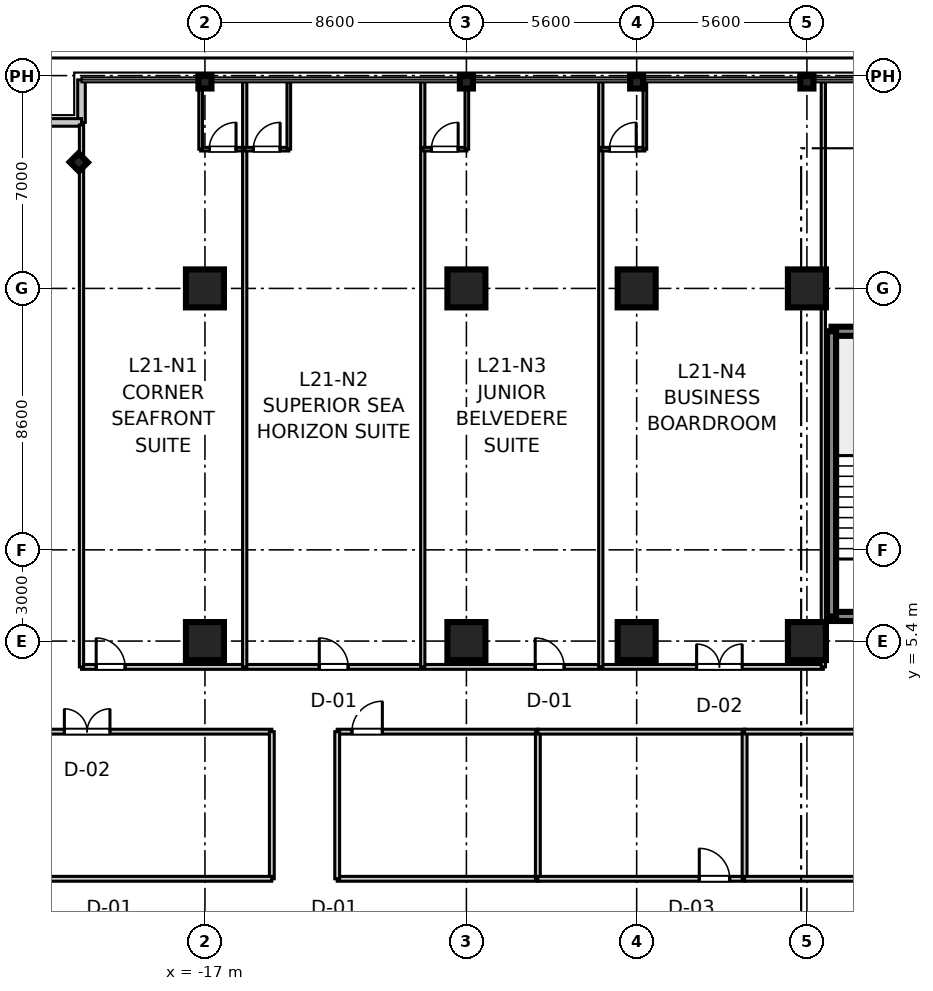
"""IFC4 building model, lengths in metres.
Left out: names, types, materials, properties, quantities, classifications, styles, units other than length and angle.
Written with IfcOpenShell. Run it as: python <this file> out.ifc"""

import sys

from ifc_helpers import new_model, si_unit, direction, frame, frame_2d, origin, origin_2d, place, context, subcontext, project, spatial, rectangle, i_section, extrude, source, transform, mapped, element, fill, save


model = new_model("IFC4")
c1 = context("Model", 3, precision=1e-05, world=origin(), true_north=direction((0.0, 1.0)))
c2 = subcontext(c1, "Body", "Model", "MODEL_VIEW")
j1 = project(units=[si_unit("LENGTHUNIT", "METRE"), si_unit("PLANEANGLEUNIT", "RADIAN")], contexts=[c1])
p1 = place(None, origin())
s1 = spatial("IfcSite", under=j1, at=p1, CompositionType="ELEMENT")
p2 = place(p1, origin())
s2 = spatial("IfcBuilding", under=s1, at=p2, CompositionType="ELEMENT")
p3 = place(p2, frame((0.0, 0.0, 88.3)))
s3 = spatial("IfcBuildingStorey", under=s2, at=p3, CompositionType="ELEMENT", Elevation=88.3)
m1 = source(origin(), c2, "Body", "SweptSolid", [
    extrude(rectangle(XDim=1.25, YDim=1.25, at=origin_2d()), origin(), (0.0, 0.0, 1.0), 3.605),
])
for number, where, z_axis, x_axis in (
    (1, (-17.0, 5.4, 0.0), (0.0, 0.0, 1.0), (1.0, 0.0, 0.0)),
    (2, (-17.0, 17.0, 0.0), (0.0, 0.0, 1.0), (1.0, 0.0, 0.0)),
    (3, (-8.4, 5.4, 0.0), (0.0, 0.0, 1.0), (1.0, 0.0, 0.0)),
    (4, (-8.4, 17.0, 0.0), (0.0, 0.0, 1.0), (1.0, 0.0, 0.0)),
    (5, (-2.8, 5.4, 0.0), (0.0, 0.0, 1.0), (1.0, 0.0, 0.0)),
    (6, (-2.8, 17.0, 0.0), (0.0, 0.0, 1.0), (1.0, 0.0, 0.0)),
    (7, (2.8, 5.4, 0.0), (0.0, 0.0, 1.0), (1.0, 0.0, 0.0)),
    (8, (2.8, 17.0, 0.0), (0.0, 0.0, 1.0), (1.0, 0.0, 0.0)),
):
    element("IfcColumn", number, at=place(p3, frame(where, z_axis=z_axis, x_axis=x_axis)), inside=s3, PredefinedType="COLUMN", context=c2, shape_type="MappedRepresentation", body=[
        mapped(m1, transform((0.0, 0.0, 0.0), scale=1.0)),
    ])
m2 = source(origin(), c2, "Body", "SweptSolid", [
    extrude(i_section(OverallWidth=0.409, OverallDepth=0.43, WebThickness=0.021, FlangeThickness=0.034, at=origin_2d()), origin(), (0.0, 0.0, 1.0), 3.605),
])
for number, where, z_axis, x_axis in (
    (9, (-17.0, 23.78, 0.0), (0.0, 0.0, 1.0), (0.0, 1.0, 0.0)),
    (10, (-8.4, 23.78, 0.0), (0.0, 0.0, 1.0), (0.0, 1.0, 0.0)),
    (11, (-2.8, 23.78, 0.0), (0.0, 0.0, 1.0), (0.0, 1.0, 0.0)),
    (12, (2.8, 23.78, 0.0), (0.0, 0.0, 1.0), (0.0, 1.0, 0.0)),
    (13, (-21.15, 21.15, 0.0), (0.0, 0.0, 1.0), (0.707, 0.707, 0.0)),
):
    element("IfcColumn", number, at=place(p3, frame(where, z_axis=z_axis, x_axis=x_axis)), inside=s3, PredefinedType="COLUMN", context=c2, shape_type="MappedRepresentation", body=[
        mapped(m2, transform((0.0, 0.0, 0.0), scale=1.0)),
    ])
m3 = source(origin(), c2, "Body", "SweptSolid", [
    extrude(rectangle(XDim=3.98, YDim=0.3, at=frame_2d((1.99, 0.0))), origin(), (0.0, 0.0, 1.0), 3.38),
])
for number, where, z_axis, x_axis in (
    (14, (3.61, 6.21, 0.0), (0.0, 0.0, 1.0), (1.0, 0.0, 0.0)),
    (15, (3.61, 15.59, 0.0), (0.0, 0.0, 1.0), (1.0, 0.0, 0.0)),
):
    element("IfcWall", number, at=place(p3, frame(where, z_axis=z_axis, x_axis=x_axis)), inside=s3, PredefinedType="SHEAR", context=c2, shape_type="MappedRepresentation", body=[
        mapped(m3, transform((0.0, 0.0, 0.0), scale=1.0)),
    ])
m4 = source(origin(), c2, "Body", "SweptSolid", [
    extrude(rectangle(XDim=9.38, YDim=0.3, at=frame_2d((4.69, 0.0))), origin(), (0.0, 0.0, 1.0), 3.38),
])
p4 = place(p3, frame((3.61, 6.21, 0.0), z_axis=(0.0, 0.0, 1.0), x_axis=(0.0, 1.0, 0.0)))
e16 = element("IfcWall", 16, at=p4, inside=s3, PredefinedType="SHEAR", context=c2, shape_type="MappedRepresentation", body=[
    mapped(m4, transform((0.0, 0.0, 0.0), scale=1.0)),
])
m5 = source(origin(), c2, "Body", "SweptSolid", [
    extrude(rectangle(XDim=1.4, YDim=0.25, at=frame_2d((0.7, 0.0))), origin(), (0.0, 0.0, 1.0), 3.38),
])
p5 = place(p3, frame((-21.06, 22.46, 0.0), z_axis=(0.0, 0.0, 1.0), x_axis=(0.0, 1.0, 0.0)))
e17 = element("IfcWall", 17, at=p5, inside=s3, PredefinedType="STANDARD", context=c2, shape_type="MappedRepresentation", body=[
    mapped(m5, transform((0.0, 0.0, 0.0), scale=1.0)),
])
m6 = source(origin(), c2, "Body", "SweptSolid", [
    extrude(rectangle(XDim=1.4, YDim=0.25, at=frame_2d((0.7, 0.0))), origin(), (0.0, 0.0, 1.0), 3.38),
])
p6 = place(p3, frame((-22.46, 22.46, 0.0), z_axis=(0.0, 0.0, 1.0), x_axis=(1.0, 0.0, 0.0)))
e18 = element("IfcWall", 18, at=p6, inside=s3, PredefinedType="STANDARD", context=c2, shape_type="MappedRepresentation", body=[
    mapped(m6, transform((0.0, 0.0, 0.0), scale=1.0)),
])
m7 = source(origin(), c2, "Body", "SweptSolid", [
    extrude(rectangle(XDim=24.4, YDim=0.16, at=frame_2d((12.2, 0.0))), origin(), (0.0, 0.0, 1.0), 2.72),
])
p7 = place(p3, frame((-21.06, 4.55, 0.0), z_axis=(0.0, 0.0, 1.0), x_axis=(1.0, 0.0, 0.0)))
e19 = element("IfcWall", 19, at=p7, inside=s3, PredefinedType="PARTITIONING", context=c2, shape_type="MappedRepresentation", body=[
    mapped(m7, transform((0.0, 0.0, 0.0), scale=1.0)),
])
p8 = place(p7, frame((0.483, 0.0, 0.0)))
e20 = element("IfcOpeningElement", 20, at=p8, cuts=e19, PredefinedType="OPENING", context=c2, shape_type="SweptSolid", body=[
    extrude(rectangle(XDim=0.95, YDim=2.1, at=frame_2d((0.475, 1.05))), frame((0.0, 0.09, 0.0), z_axis=(0.0, -1.0, 0.0), x_axis=(1.0, 0.0, 0.0)), (0.0, 0.0, 1.0), 0.18),
])
p9 = place(p7, frame((7.821, 0.0, 0.0)))
e21 = element("IfcOpeningElement", 21, at=p9, cuts=e19, PredefinedType="OPENING", context=c2, shape_type="SweptSolid", body=[
    extrude(rectangle(XDim=0.95, YDim=2.1, at=frame_2d((0.475, 1.05))), frame((0.0, 0.09, 0.0), z_axis=(0.0, -1.0, 0.0), x_axis=(1.0, 0.0, 0.0)), (0.0, 0.0, 1.0), 0.18),
])
p10 = place(p7, frame((14.924, 0.0, 0.0)))
e22 = element("IfcOpeningElement", 22, at=p10, cuts=e19, PredefinedType="OPENING", context=c2, shape_type="SweptSolid", body=[
    extrude(rectangle(XDim=0.95, YDim=2.1, at=frame_2d((0.475, 1.05))), frame((0.0, 0.09, 0.0), z_axis=(0.0, -1.0, 0.0), x_axis=(1.0, 0.0, 0.0)), (0.0, 0.0, 1.0), 0.18),
])
p11 = place(p7, frame((20.232, 0.0, 0.0)))
e23 = element("IfcOpeningElement", 23, at=p11, cuts=e19, PredefinedType="OPENING", context=c2, shape_type="SweptSolid", body=[
    extrude(rectangle(XDim=1.5, YDim=2.15, at=frame_2d((0.75, 1.075))), frame((0.0, 0.09, 0.0), z_axis=(0.0, -1.0, 0.0), x_axis=(1.0, 0.0, 0.0)), (0.0, 0.0, 1.0), 0.18),
])
m8 = source(origin(), c2, "Body", "SweptSolid", [
    extrude(rectangle(XDim=17.83, YDim=0.14, at=frame_2d((8.915, 0.0))), origin(), (0.0, 0.0, 1.0), 2.72),
])
p12 = place(p3, frame((-21.06, 4.55, 0.0), z_axis=(0.0, 0.0, 1.0), x_axis=(0.0, 1.0, 0.0)))
e24 = element("IfcWall", 24, at=p12, inside=s3, PredefinedType="PARTITIONING", context=c2, shape_type="MappedRepresentation", body=[
    mapped(m8, transform((0.0, 0.0, 0.0), scale=1.0)),
])
m9 = source(origin(), c2, "Body", "SweptSolid", [
    extrude(rectangle(XDim=19.25, YDim=0.14, at=frame_2d((9.625, 0.0))), origin(), (0.0, 0.0, 1.0), 2.72),
])
p13 = place(p3, frame((3.34, 4.55, 0.0), z_axis=(0.0, 0.0, 1.0), x_axis=(0.0, 1.0, 0.0)))
e25 = element("IfcWall", 25, at=p13, inside=s3, PredefinedType="PARTITIONING", context=c2, shape_type="MappedRepresentation", body=[
    mapped(m9, transform((0.0, 0.0, 0.0), scale=1.0)),
])
m10 = source(origin(), c2, "Body", "SweptSolid", [
    extrude(rectangle(XDim=1.45, YDim=0.12, at=frame_2d((0.725, 0.0))), origin(), (0.0, 0.0, 1.0), 2.72),
])
p14 = place(p3, frame((-17.142, 21.58, 0.0), z_axis=(0.0, 0.0, 1.0), x_axis=(1.0, 0.0, 0.0)))
e26 = element("IfcWall", 26, at=p14, inside=s3, PredefinedType="PARTITIONING", context=c2, shape_type="MappedRepresentation", body=[
    mapped(m10, transform((0.0, 0.0, 0.0), scale=1.0)),
])
p15 = place(p14, frame((0.285, 0.0, 0.0)))
e27 = element("IfcOpeningElement", 27, at=p15, cuts=e26, PredefinedType="OPENING", context=c2, shape_type="SweptSolid", body=[
    extrude(rectangle(XDim=0.88, YDim=2.1, at=frame_2d((0.44, 1.05))), frame((0.0, 0.07, 0.0), z_axis=(0.0, -1.0, 0.0), x_axis=(1.0, 0.0, 0.0)), (0.0, 0.0, 1.0), 0.14),
])
m11 = source(origin(), c2, "Body", "SweptSolid", [
    extrude(rectangle(XDim=2.22, YDim=0.12, at=frame_2d((1.11, 0.0))), origin(), (0.0, 0.0, 1.0), 2.72),
])
p16 = place(p3, frame((-17.142, 21.58, 0.0), z_axis=(0.0, 0.0, 1.0), x_axis=(0.0, 1.0, 0.0)))
e28 = element("IfcWall", 28, at=p16, inside=s3, PredefinedType="PARTITIONING", context=c2, shape_type="MappedRepresentation", body=[
    mapped(m11, transform((0.0, 0.0, 0.0), scale=1.0)),
])
p17 = place(p3, frame((-15.692, 4.55, 0.0), z_axis=(0.0, 0.0, 1.0), x_axis=(0.0, 1.0, 0.0)))
e29 = element("IfcWall", 29, at=p17, inside=s3, PredefinedType="PARTITIONING", context=c2, shape_type="MappedRepresentation", body=[
    mapped(m9, transform((0.0, 0.0, 0.0), scale=1.0)),
])
m12 = source(origin(), c2, "Body", "SweptSolid", [
    extrude(rectangle(XDim=1.45, YDim=0.12, at=frame_2d((0.725, 0.0))), origin(), (0.0, 0.0, 1.0), 2.72),
])
p18 = place(p3, frame((-15.692, 21.58, 0.0), z_axis=(0.0, 0.0, 1.0), x_axis=(1.0, 0.0, 0.0)))
e30 = element("IfcWall", 30, at=p18, inside=s3, PredefinedType="PARTITIONING", context=c2, shape_type="MappedRepresentation", body=[
    mapped(m12, transform((0.0, 0.0, 0.0), scale=1.0)),
])
p19 = place(p18, frame((0.285, 0.0, 0.0)))
e31 = element("IfcOpeningElement", 31, at=p19, cuts=e30, PredefinedType="OPENING", context=c2, shape_type="SweptSolid", body=[
    extrude(rectangle(XDim=0.88, YDim=2.1, at=frame_2d((0.44, 1.05))), frame((0.0, 0.07, 0.0), z_axis=(0.0, -1.0, 0.0), x_axis=(1.0, 0.0, 0.0)), (0.0, 0.0, 1.0), 0.14),
])
p20 = place(p3, frame((-14.242, 21.58, 0.0), z_axis=(0.0, 0.0, 1.0), x_axis=(0.0, 1.0, 0.0)))
e32 = element("IfcWall", 32, at=p20, inside=s3, PredefinedType="PARTITIONING", context=c2, shape_type="MappedRepresentation", body=[
    mapped(m11, transform((0.0, 0.0, 0.0), scale=1.0)),
])
p21 = place(p3, frame((-9.836, 4.55, 0.0), z_axis=(0.0, 0.0, 1.0), x_axis=(0.0, 1.0, 0.0)))
e33 = element("IfcWall", 33, at=p21, inside=s3, PredefinedType="PARTITIONING", context=c2, shape_type="MappedRepresentation", body=[
    mapped(m9, transform((0.0, 0.0, 0.0), scale=1.0)),
])
p22 = place(p3, frame((-9.836, 21.58, 0.0), z_axis=(0.0, 0.0, 1.0), x_axis=(1.0, 0.0, 0.0)))
e34 = element("IfcWall", 34, at=p22, inside=s3, PredefinedType="PARTITIONING", context=c2, shape_type="MappedRepresentation", body=[
    mapped(m12, transform((0.0, 0.0, 0.0), scale=1.0)),
])
p23 = place(p22, frame((0.285, 0.0, 0.0)))
e35 = element("IfcOpeningElement", 35, at=p23, cuts=e34, PredefinedType="OPENING", context=c2, shape_type="SweptSolid", body=[
    extrude(rectangle(XDim=0.88, YDim=2.1, at=frame_2d((0.44, 1.05))), frame((0.0, 0.07, 0.0), z_axis=(0.0, -1.0, 0.0), x_axis=(1.0, 0.0, 0.0)), (0.0, 0.0, 1.0), 0.14),
])
p24 = place(p3, frame((-8.386, 21.58, 0.0), z_axis=(0.0, 0.0, 1.0), x_axis=(0.0, 1.0, 0.0)))
e36 = element("IfcWall", 36, at=p24, inside=s3, PredefinedType="PARTITIONING", context=c2, shape_type="MappedRepresentation", body=[
    mapped(m11, transform((0.0, 0.0, 0.0), scale=1.0)),
])
p25 = place(p3, frame((-3.98, 4.55, 0.0), z_axis=(0.0, 0.0, 1.0), x_axis=(0.0, 1.0, 0.0)))
e37 = element("IfcWall", 37, at=p25, inside=s3, PredefinedType="PARTITIONING", context=c2, shape_type="MappedRepresentation", body=[
    mapped(m9, transform((0.0, 0.0, 0.0), scale=1.0)),
])
p26 = place(p3, frame((-3.98, 21.58, 0.0), z_axis=(0.0, 0.0, 1.0), x_axis=(1.0, 0.0, 0.0)))
e38 = element("IfcWall", 38, at=p26, inside=s3, PredefinedType="PARTITIONING", context=c2, shape_type="MappedRepresentation", body=[
    mapped(m12, transform((0.0, 0.0, 0.0), scale=1.0)),
])
p27 = place(p26, frame((0.285, 0.0, 0.0)))
e39 = element("IfcOpeningElement", 39, at=p27, cuts=e38, PredefinedType="OPENING", context=c2, shape_type="SweptSolid", body=[
    extrude(rectangle(XDim=0.88, YDim=2.1, at=frame_2d((0.44, 1.05))), frame((0.0, 0.07, 0.0), z_axis=(0.0, -1.0, 0.0), x_axis=(1.0, 0.0, 0.0)), (0.0, 0.0, 1.0), 0.14),
])
p28 = place(p3, frame((-2.53, 21.58, 0.0), z_axis=(0.0, 0.0, 1.0), x_axis=(0.0, 1.0, 0.0)))
e40 = element("IfcWall", 40, at=p28, inside=s3, PredefinedType="PARTITIONING", context=c2, shape_type="MappedRepresentation", body=[
    mapped(m11, transform((0.0, 0.0, 0.0), scale=1.0)),
])
m13 = source(origin(), c2, "Body", "SweptSolid", [
    extrude(rectangle(XDim=9.0, YDim=0.16, at=frame_2d((4.5, 0.0))), origin(), (0.0, 0.0, 1.0), 2.72),
])
p29 = place(p3, frame((-23.8, 2.42, 0.0), z_axis=(0.0, 0.0, 1.0), x_axis=(1.0, 0.0, 0.0)))
e41 = element("IfcWall", 41, at=p29, inside=s3, PredefinedType="PARTITIONING", context=c2, shape_type="MappedRepresentation", body=[
    mapped(m13, transform((0.0, 0.0, 0.0), scale=1.0)),
])
p30 = place(p29, frame((2.176, 0.0, 0.0)))
e42 = element("IfcOpeningElement", 42, at=p30, cuts=e41, PredefinedType="OPENING", context=c2, shape_type="SweptSolid", body=[
    extrude(rectangle(XDim=1.5, YDim=2.15, at=frame_2d((0.75, 1.075))), frame((0.0, 0.09, 0.0), z_axis=(0.0, -1.0, 0.0), x_axis=(1.0, 0.0, 0.0)), (0.0, 0.0, 1.0), 0.18),
])
m14 = source(origin(), c2, "Body", "SweptSolid", [
    extrude(rectangle(XDim=4.84, YDim=0.16, at=frame_2d((2.42, 0.0))), origin(), (0.0, 0.0, 1.0), 2.72),
])
p31 = place(p3, frame((-14.8, -2.42, 0.0), z_axis=(0.0, 0.0, 1.0), x_axis=(0.0, 1.0, 0.0)))
e43 = element("IfcWall", 43, at=p31, inside=s3, PredefinedType="PARTITIONING", context=c2, shape_type="MappedRepresentation", body=[
    mapped(m14, transform((0.0, 0.0, 0.0), scale=1.0)),
])
p32 = place(p3, frame((-23.8, -2.42, 0.0), z_axis=(0.0, 0.0, 1.0), x_axis=(1.0, 0.0, 0.0)))
e44 = element("IfcWall", 44, at=p32, inside=s3, PredefinedType="PARTITIONING", context=c2, shape_type="MappedRepresentation", body=[
    mapped(m13, transform((0.0, 0.0, 0.0), scale=1.0)),
])
m15 = source(origin(), c2, "Body", "SweptSolid", [
    extrude(rectangle(XDim=6.6, YDim=0.16, at=frame_2d((3.3, 0.0))), origin(), (0.0, 0.0, 1.0), 2.72),
])
p33 = place(p3, frame((-12.65, -2.42, 0.0), z_axis=(0.0, 0.0, 1.0), x_axis=(1.0, 0.0, 0.0)))
e45 = element("IfcWall", 45, at=p33, inside=s3, PredefinedType="PARTITIONING", context=c2, shape_type="MappedRepresentation", body=[
    mapped(m15, transform((0.0, 0.0, 0.0), scale=1.0)),
])
p34 = place(p3, frame((-12.65, 2.42, 0.0), z_axis=(0.0, 0.0, 1.0), x_axis=(1.0, 0.0, 0.0)))
e46 = element("IfcWall", 46, at=p34, inside=s3, PredefinedType="PARTITIONING", context=c2, shape_type="MappedRepresentation", body=[
    mapped(m15, transform((0.0, 0.0, 0.0), scale=1.0)),
])
p35 = place(p34, frame((0.485, 0.0, 0.0)))
e47 = element("IfcOpeningElement", 47, at=p35, cuts=e46, PredefinedType="OPENING", context=c2, shape_type="SweptSolid", body=[
    extrude(rectangle(XDim=1.0, YDim=2.1, at=frame_2d((0.5, 1.05))), frame((0.0, 0.09, 0.0), z_axis=(0.0, -1.0, 0.0), x_axis=(1.0, 0.0, 0.0)), (0.0, 0.0, 1.0), 0.18),
])
for number, where, z_axis, x_axis in (
    (48, (-12.65, -2.42, 0.0), (0.0, 0.0, 1.0), (0.0, 1.0, 0.0)),
    (49, (-6.05, -2.42, 0.0), (0.0, 0.0, 1.0), (0.0, 1.0, 0.0)),
):
    element("IfcWall", number, at=place(p3, frame(where, z_axis=z_axis, x_axis=x_axis)), inside=s3, PredefinedType="PARTITIONING", context=c2, shape_type="MappedRepresentation", body=[
        mapped(m14, transform((0.0, 0.0, 0.0), scale=1.0)),
    ])
m16 = source(origin(), c2, "Body", "SweptSolid", [
    extrude(rectangle(XDim=6.8, YDim=0.16, at=frame_2d((3.4, 0.0))), origin(), (0.0, 0.0, 1.0), 2.72),
])
p36 = place(p3, frame((-6.05, -2.42, 0.0), z_axis=(0.0, 0.0, 1.0), x_axis=(1.0, 0.0, 0.0)))
e50 = element("IfcWall", 50, at=p36, inside=s3, PredefinedType="PARTITIONING", context=c2, shape_type="MappedRepresentation", body=[
    mapped(m16, transform((0.0, 0.0, 0.0), scale=1.0)),
])
p37 = place(p36, frame((5.31, 0.0, 0.0)))
e51 = element("IfcOpeningElement", 51, at=p37, cuts=e50, PredefinedType="OPENING", context=c2, shape_type="SweptSolid", body=[
    extrude(rectangle(XDim=1.0, YDim=2.1, at=frame_2d((0.5, 1.05))), frame((0.0, 0.09, 0.0), z_axis=(0.0, -1.0, 0.0), x_axis=(1.0, 0.0, 0.0)), (0.0, 0.0, 1.0), 0.18),
])
p38 = place(p3, frame((-6.05, 2.42, 0.0), z_axis=(0.0, 0.0, 1.0), x_axis=(1.0, 0.0, 0.0)))
e52 = element("IfcWall", 52, at=p38, inside=s3, PredefinedType="PARTITIONING", context=c2, shape_type="MappedRepresentation", body=[
    mapped(m16, transform((0.0, 0.0, 0.0), scale=1.0)),
])
p39 = place(p3, frame((0.75, -2.42, 0.0), z_axis=(0.0, 0.0, 1.0), x_axis=(0.0, 1.0, 0.0)))
e53 = element("IfcWall", 53, at=p39, inside=s3, PredefinedType="PARTITIONING", context=c2, shape_type="MappedRepresentation", body=[
    mapped(m14, transform((0.0, 0.0, 0.0), scale=1.0)),
])
m17 = source(origin(), c2, "Body", "SweptSolid", [
    extrude(rectangle(XDim=6.6, YDim=0.16, at=frame_2d((3.3, 0.0))), origin(), (0.0, 0.0, 1.0), 2.72),
])
p40 = place(p3, frame((0.75, -2.42, 0.0), z_axis=(0.0, 0.0, 1.0), x_axis=(1.0, 0.0, 0.0)))
e54 = element("IfcWall", 54, at=p40, inside=s3, PredefinedType="PARTITIONING", context=c2, shape_type="MappedRepresentation", body=[
    mapped(m17, transform((0.0, 0.0, 0.0), scale=1.0)),
])
p41 = place(p3, frame((0.75, 2.42, 0.0), z_axis=(0.0, 0.0, 1.0), x_axis=(1.0, 0.0, 0.0)))
e55 = element("IfcWall", 55, at=p41, inside=s3, PredefinedType="PARTITIONING", context=c2, shape_type="MappedRepresentation", body=[
    mapped(m17, transform((0.0, 0.0, 0.0), scale=1.0)),
])
p42 = place(p41, frame((4.273, 0.0, 0.0)))
e56 = element("IfcOpeningElement", 56, at=p42, cuts=e55, PredefinedType="OPENING", context=c2, shape_type="SweptSolid", body=[
    extrude(rectangle(XDim=1.0, YDim=2.1, at=frame_2d((0.5, 1.05))), frame((0.0, 0.09, 0.0), z_axis=(0.0, -1.0, 0.0), x_axis=(1.0, 0.0, 0.0)), (0.0, 0.0, 1.0), 0.18),
])
m18 = source(origin(), c2, "Body", "SweptSolid", [
    extrude(rectangle(XDim=0.88, YDim=2.1, at=frame_2d((0.44, 1.05))), frame((0.0, 0.025, 0.0), z_axis=(0.0, -1.0, 0.0), x_axis=(1.0, 0.0, 0.0)), (0.0, 0.0, 1.0), 0.05),
])
p43 = place(p15, origin())
e57 = element("IfcDoor", 57, at=p43, inside=s3, OperationType="SINGLE_SWING_RIGHT", PredefinedType="DOOR", context=c2, shape_type="MappedRepresentation", body=[
    mapped(m18, transform((0.0, 0.0, 0.0), scale=1.0)),
])
fill(e27, e57)
m19 = source(origin(), c2, "Body", "SweptSolid", [
    extrude(rectangle(XDim=0.95, YDim=2.1, at=frame_2d((0.475, 1.05))), frame((0.0, 0.025, 0.0), z_axis=(0.0, -1.0, 0.0), x_axis=(1.0, 0.0, 0.0)), (0.0, 0.0, 1.0), 0.05),
])
p44 = place(p8, origin())
e58 = element("IfcDoor", 58, at=p44, inside=s3, OperationType="SINGLE_SWING_LEFT", PredefinedType="DOOR", context=c2, shape_type="MappedRepresentation", body=[
    mapped(m19, transform((0.0, 0.0, 0.0), scale=1.0)),
])
fill(e20, e58)
p45 = place(p19, origin())
e59 = element("IfcDoor", 59, at=p45, inside=s3, OperationType="SINGLE_SWING_RIGHT", PredefinedType="DOOR", context=c2, shape_type="MappedRepresentation", body=[
    mapped(m18, transform((0.0, 0.0, 0.0), scale=1.0)),
])
fill(e31, e59)
p46 = place(p9, origin())
e60 = element("IfcDoor", 60, at=p46, inside=s3, OperationType="SINGLE_SWING_LEFT", PredefinedType="DOOR", context=c2, shape_type="MappedRepresentation", body=[
    mapped(m19, transform((0.0, 0.0, 0.0), scale=1.0)),
])
fill(e21, e60)
p47 = place(p23, origin())
e61 = element("IfcDoor", 61, at=p47, inside=s3, OperationType="SINGLE_SWING_RIGHT", PredefinedType="DOOR", context=c2, shape_type="MappedRepresentation", body=[
    mapped(m18, transform((0.0, 0.0, 0.0), scale=1.0)),
])
fill(e35, e61)
p48 = place(p10, origin())
e62 = element("IfcDoor", 62, at=p48, inside=s3, OperationType="SINGLE_SWING_LEFT", PredefinedType="DOOR", context=c2, shape_type="MappedRepresentation", body=[
    mapped(m19, transform((0.0, 0.0, 0.0), scale=1.0)),
])
fill(e22, e62)
p49 = place(p27, origin())
e63 = element("IfcDoor", 63, at=p49, inside=s3, OperationType="SINGLE_SWING_RIGHT", PredefinedType="DOOR", context=c2, shape_type="MappedRepresentation", body=[
    mapped(m18, transform((0.0, 0.0, 0.0), scale=1.0)),
])
fill(e39, e63)
m20 = source(origin(), c2, "Body", "SweptSolid", [
    extrude(rectangle(XDim=1.5, YDim=2.15, at=frame_2d((0.75, 1.075))), frame((0.0, 0.025, 0.0), z_axis=(0.0, -1.0, 0.0), x_axis=(1.0, 0.0, 0.0)), (0.0, 0.0, 1.0), 0.05),
])
p50 = place(p11, origin())
e64 = element("IfcDoor", 64, at=p50, inside=s3, OperationType="DOUBLE_DOOR_SINGLE_SWING", PredefinedType="DOOR", context=c2, shape_type="MappedRepresentation", body=[
    mapped(m20, transform((0.0, 0.0, 0.0), scale=1.0)),
])
fill(e23, e64)
p51 = place(p30, origin())
e65 = element("IfcDoor", 65, at=p51, inside=s3, OperationType="DOUBLE_DOOR_SINGLE_SWING", PredefinedType="DOOR", context=c2, shape_type="MappedRepresentation", body=[
    mapped(m20, transform((0.0, 0.0, 0.0), scale=1.0)),
])
fill(e42, e65)
m21 = source(origin(), c2, "Body", "SweptSolid", [
    extrude(rectangle(XDim=1.0, YDim=2.1, at=frame_2d((0.5, 1.05))), frame((0.0, 0.025, 0.0), z_axis=(0.0, -1.0, 0.0), x_axis=(1.0, 0.0, 0.0)), (0.0, 0.0, 1.0), 0.05),
])
p52 = place(p35, frame((1.0, 0.0, 0.0), z_axis=(0.0, 0.0, 1.0), x_axis=(-1.0, 0.0, 0.0)))
e66 = element("IfcDoor", 66, at=p52, inside=s3, OperationType="SINGLE_SWING_RIGHT", PredefinedType="DOOR", context=c2, shape_type="MappedRepresentation", body=[
    mapped(m21, transform((0.0, 0.0, 0.0), scale=1.0)),
])
fill(e47, e66)
p53 = place(p37, origin())
e67 = element("IfcDoor", 67, at=p53, inside=s3, OperationType="SINGLE_SWING_LEFT", PredefinedType="DOOR", context=c2, shape_type="MappedRepresentation", body=[
    mapped(m21, transform((0.0, 0.0, 0.0), scale=1.0)),
])
fill(e51, e67)
save(model, sys.argv[1])
